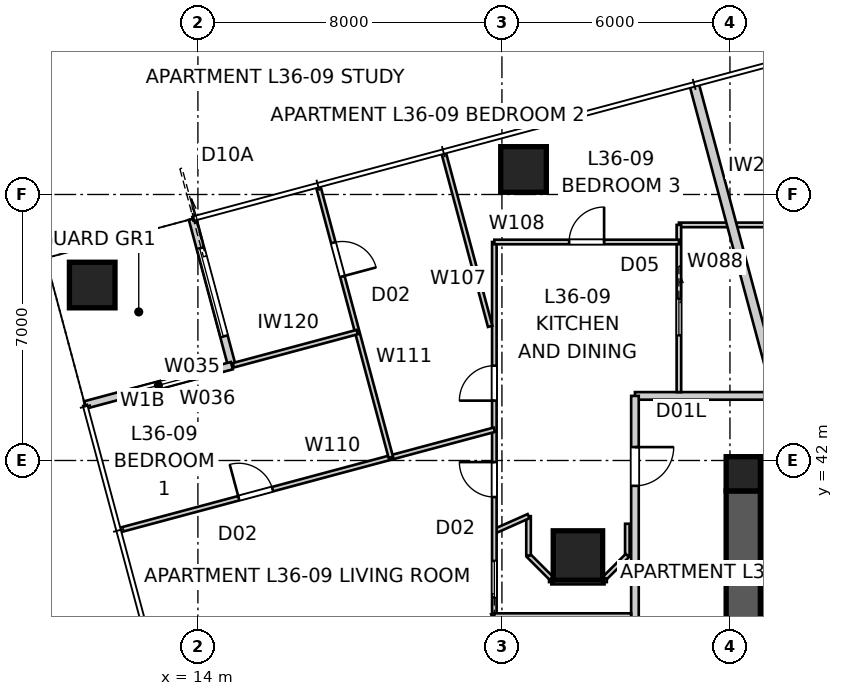
"""IFC4 building model, lengths in metres.
Left out: names, types, materials, properties, quantities, classifications, styles, units other than length and angle.
Written with IfcOpenShell. Run it as: python <this file> out.ifc"""

import sys

from ifc_helpers import new_model, si_unit, direction, frame, frame_2d, origin, origin_2d, place, context, subcontext, project, spatial, polyline, rectangle, outline, extrude, element, fill, save


model = new_model("IFC4")
c1 = context("Model", 3, precision=1e-05, world=origin(), true_north=direction((0.0, 1.0)))
c2 = subcontext(c1, "Body", "Model", "MODEL_VIEW")
j1 = project(units=[si_unit("LENGTHUNIT", "METRE"), si_unit("PLANEANGLEUNIT", "RADIAN")], contexts=[c1])
p1 = place(None, origin())
s1 = spatial("IfcSite", under=j1, at=p1, CompositionType="ELEMENT")
p2 = place(p1, origin())
s2 = spatial("IfcBuilding", under=s1, at=p2, CompositionType="ELEMENT")
p3 = place(p2, frame((0.0, 0.0, 132.0)))
s3 = spatial("IfcBuildingStorey", under=s2, at=p3, CompositionType="ELEMENT", Elevation=132.0)
p4 = place(p3, frame((28.8, 41.65, 0.0), z_axis=(0.0, 0.0, 1.0), x_axis=(1.0, 0.0, 0.0)))
e1 = element("IfcWall", 1, at=p4, inside=s3, PredefinedType="SHEAR", context=c2, shape_type="SweptSolid", body=[
    extrude(outline(polyline([(0.0, -0.45), (22.4, -0.45), (22.4, -0.025), (22.85, -0.025), (22.85, 0.025), (22.4, 0.025), (22.4, 0.45), (0.0, 0.45), (0.0, 0.025), (-0.45, 0.025), (-0.45, -0.025), (0.0, -0.025), (0.0, -0.45)])), origin(), (0.0, 0.0, 1.0), 3.4),
])
p5 = place(p3, frame((28.35, 41.2, 0.0), z_axis=(0.0, 0.0, 1.0), x_axis=(0.0, -1.0, 0.0)))
e2 = element("IfcWall", 2, at=p5, inside=s3, PredefinedType="SHEAR", context=c2, shape_type="SweptSolid", body=[
    extrude(outline(polyline([(0.0, -0.45), (22.4, -0.45), (22.4, -0.025), (22.85, -0.025), (22.85, 0.025), (22.4, 0.025), (22.4, 0.45), (0.0, 0.45), (0.0, 0.025), (-0.45, 0.025), (-0.45, -0.025), (0.0, -0.025), (0.0, -0.45)])), origin(), (0.0, 0.0, 1.0), 3.4),
])
p6 = place(p5, frame((11.14, 0.0, 0.0)))
e3 = element("IfcOpeningElement", 3, at=p6, cuts=e2, PredefinedType="OPENING", context=c2, shape_type="SweptSolid", body=[
    extrude(rectangle(XDim=1.02, YDim=2.4, at=frame_2d((0.51, 1.2))), frame((0.0, 0.46, 0.0), z_axis=(0.0, -1.0, 0.0), x_axis=(1.0, 0.0, 0.0)), (0.0, 0.0, 1.0), 0.92),
])
p7 = place(p3, frame((28.8, 39.75, 0.0), z_axis=(0.0, 0.0, 1.0), x_axis=(1.0, 0.0, 0.0)))
e4 = element("IfcWall", 4, at=p7, inside=s3, PredefinedType="SHEAR", context=c2, shape_type="SweptSolid", body=[
    extrude(rectangle(XDim=3.5, YDim=0.3, at=frame_2d((1.75, 0.0))), origin(), (0.0, 0.0, 1.0), 3.4),
])
p8 = place(p3, frame((28.35, 41.65, 0.0), z_axis=(0.0, 0.0, 1.0), x_axis=(1.0, 0.0, 0.0)))
e5 = element("IfcColumn", 5, at=p8, inside=s3, PredefinedType="COLUMN", context=c2, shape_type="SweptSolid", body=[
    extrude(rectangle(XDim=0.9, YDim=0.9, at=origin_2d()), origin(), (0.0, 0.0, 1.0), 3.4),
])
for number, where, z_axis, x_axis in (
    (6, (22.568, 49.658, 0.0), (0.0, 0.0, 1.0), (1.0, 0.0, 0.0)),
    (7, (11.219, 46.617, 0.0), (0.0, 0.0, 1.0), (1.0, 0.0, 0.0)),
):
    element("IfcColumn", number, at=place(p3, frame(where, z_axis=z_axis, x_axis=x_axis)), inside=s3, PredefinedType="COLUMN", context=c2, shape_type="SweptSolid", body=[
        extrude(rectangle(XDim=1.2, YDim=1.2, at=origin_2d()), origin(), (0.0, 0.0, 1.0), 3.4),
    ])
p9 = place(p3, frame((24.0, 39.5, 0.0), z_axis=(0.0, 0.0, 1.0), x_axis=(1.0, 0.0, 0.0)))
e8 = element("IfcColumn", 8, at=p9, inside=s3, PredefinedType="COLUMN", context=c2, shape_type="SweptSolid", body=[
    extrude(rectangle(XDim=1.3, YDim=1.3, at=origin_2d()), origin(), (0.0, 0.0, 1.0), 3.4),
])
p10 = place(p3, frame((13.857, 48.359, 0.0), z_axis=(0.0, 0.0, 1.0), x_axis=(0.258843877716, -0.965919172068, 0.0)))
e9 = element("IfcWall", 9, at=p10, inside=s3, PredefinedType="SOLIDWALL", context=c2, shape_type="SweptSolid", body=[
    extrude(rectangle(XDim=4.0, YDim=0.2, at=frame_2d((2.0, 0.0))), origin(), (0.0, 0.0, 1.0), 3.25),
])
p11 = place(p10, frame((0.8, 0.0, 0.0)))
e10 = element("IfcOpeningElement", 10, at=p11, cuts=e9, PredefinedType="OPENING", context=c2, shape_type="SweptSolid", body=[
    extrude(rectangle(XDim=2.4, YDim=2.1, at=frame_2d((1.2, 1.05))), frame((0.0, 0.11, 0.0), z_axis=(0.0, -1.0, 0.0), x_axis=(1.0, 0.0, 0.0)), (0.0, 0.0, 1.0), 0.22),
])
p12 = place(p3, frame((14.893, 44.496, 0.0), z_axis=(0.0, 0.0, 1.0), x_axis=(-0.965934430412, -0.258786931944, 0.0)))
e11 = element("IfcWall", 11, at=p12, inside=s3, PredefinedType="SOLIDWALL", context=c2, shape_type="SweptSolid", body=[
    extrude(rectangle(XDim=4.0, YDim=0.2, at=frame_2d((2.0, 0.0))), origin(), (0.0, 0.0, 1.0), 3.25),
])
p13 = place(p12, frame((1.0, 0.0, 0.45)))
e12 = element("IfcOpeningElement", 12, at=p13, cuts=e11, PredefinedType="OPENING", context=c2, shape_type="SweptSolid", body=[
    extrude(rectangle(XDim=2.0, YDim=1.8, at=frame_2d((1.0, 0.9))), frame((0.0, 0.11, 0.0), z_axis=(0.0, -1.0, 0.0), x_axis=(1.0, 0.0, 0.0)), (0.0, 0.0, 1.0), 0.22),
])
p14 = place(p3, frame((52.52, 43.7, 0.0), z_axis=(0.0, 0.0, 1.0), x_axis=(-1.0, 0.0, 0.0)))
e13 = element("IfcWall", 13, at=p14, inside=s3, PredefinedType="PARTITIONING", context=c2, shape_type="SweptSolid", body=[
    extrude(rectangle(XDim=27.02, YDim=0.2, at=frame_2d((13.51, 0.0))), origin(), (0.0, 0.0, 1.0), 3.25),
])
p15 = place(p14, frame((10.872, 0.0, 0.0)))
e14 = element("IfcOpeningElement", 14, at=p15, cuts=e13, PredefinedType="OPENING", context=c2, shape_type="SweptSolid", body=[
    extrude(rectangle(XDim=1.02, YDim=2.34, at=frame_2d((0.51, 1.17))), frame((0.0, 0.11, 0.0), z_axis=(0.0, -1.0, 0.0), x_axis=(1.0, 0.0, 0.0)), (0.0, 0.0, 1.0), 0.22),
])
p16 = place(p14, frame((3.549, 0.0, 0.0)))
e15 = element("IfcOpeningElement", 15, at=p16, cuts=e13, PredefinedType="OPENING", context=c2, shape_type="SweptSolid", body=[
    extrude(rectangle(XDim=1.02, YDim=2.34, at=frame_2d((0.51, 1.17))), frame((0.0, 0.11, 0.0), z_axis=(0.0, -1.0, 0.0), x_axis=(1.0, 0.0, 0.0)), (0.0, 0.0, 1.0), 0.22),
])
p17 = place(p3, frame((25.5, 43.7, 0.0), z_axis=(0.0, 0.0, 1.0), x_axis=(0.0, -1.0, 0.0)))
e16 = element("IfcWall", 16, at=p17, inside=s3, PredefinedType="PARTITIONING", context=c2, shape_type="SweptSolid", body=[
    extrude(rectangle(XDim=28.2, YDim=0.2, at=frame_2d((14.1, 0.0))), origin(), (0.0, 0.0, 1.0), 3.25),
])
p18 = place(p17, frame((24.646, 0.0, 0.0)))
e17 = element("IfcOpeningElement", 17, at=p18, cuts=e16, PredefinedType="OPENING", context=c2, shape_type="SweptSolid", body=[
    extrude(rectangle(XDim=1.02, YDim=2.1, at=frame_2d((0.51, 1.05))), frame((0.0, 0.11, 0.0), z_axis=(0.0, -1.0, 0.0), x_axis=(1.0, 0.0, 0.0)), (0.0, 0.0, 1.0), 0.22),
])
p19 = place(p17, frame((14.858, 0.0, 0.0)))
e18 = element("IfcOpeningElement", 18, at=p19, cuts=e16, PredefinedType="OPENING", context=c2, shape_type="SweptSolid", body=[
    extrude(rectangle(XDim=1.02, YDim=2.34, at=frame_2d((0.51, 1.17))), frame((0.0, 0.11, 0.0), z_axis=(0.0, -1.0, 0.0), x_axis=(1.0, 0.0, 0.0)), (0.0, 0.0, 1.0), 0.22),
])
p20 = place(p17, frame((1.347, 0.0, 0.0)))
e19 = element("IfcOpeningElement", 19, at=p20, cuts=e16, PredefinedType="OPENING", context=c2, shape_type="SweptSolid", body=[
    extrude(rectangle(XDim=1.02, YDim=2.1, at=frame_2d((0.51, 1.05))), frame((0.0, 0.11, 0.0), z_axis=(0.0, -1.0, 0.0), x_axis=(1.0, 0.0, 0.0)), (0.0, 0.0, 1.0), 0.22),
])
p21 = place(p3, frame((27.058, 51.896, 0.0), z_axis=(0.0, 0.0, 1.0), x_axis=(0.258819975199, -0.96592557707, 0.0)))
e20 = element("IfcWall", 20, at=p21, inside=s3, PredefinedType="PARTITIONING", context=c2, shape_type="SweptSolid", body=[
    extrude(rectangle(XDim=8.389, YDim=0.25, at=frame_2d((4.194, 0.0))), origin(), (0.0, 0.0, 1.0), 3.25),
])
p22 = place(p3, frame((26.657, 48.2, 0.0), z_axis=(0.0, 0.0, 1.0), x_axis=(1.0, 0.0, 0.0)))
e21 = element("IfcWall", 21, at=p22, inside=s3, PredefinedType="PARTITIONING", context=c2, shape_type="SweptSolid", body=[
    extrude(rectangle(XDim=31.543, YDim=0.12, at=frame_2d((15.771, 0.0))), origin(), (0.0, 0.0, 1.0), 2.637),
])
p23 = place(p22, frame((13.4, 0.0, 0.0)))
e22 = element("IfcOpeningElement", 22, at=p23, cuts=e21, PredefinedType="OPENING", context=c2, shape_type="SweptSolid", body=[
    extrude(rectangle(XDim=0.92, YDim=2.34, at=frame_2d((0.46, 1.17))), frame((0.0, 0.07, 0.0), z_axis=(0.0, -1.0, 0.0), x_axis=(1.0, 0.0, 0.0)), (0.0, 0.0, 1.0), 0.14),
])
p24 = place(p22, frame((20.723, 0.0, 0.0)))
e23 = element("IfcOpeningElement", 23, at=p24, cuts=e21, PredefinedType="OPENING", context=c2, shape_type="SweptSolid", body=[
    extrude(rectangle(XDim=0.92, YDim=2.34, at=frame_2d((0.46, 1.17))), frame((0.0, 0.07, 0.0), z_axis=(0.0, -1.0, 0.0), x_axis=(1.0, 0.0, 0.0)), (0.0, 0.0, 1.0), 0.14),
])
p25 = place(p22, frame((10.117, 0.0, 0.0)))
e24 = element("IfcOpeningElement", 24, at=p25, cuts=e21, PredefinedType="OPENING", context=c2, shape_type="SweptSolid", body=[
    extrude(rectangle(XDim=0.96, YDim=2.1, at=frame_2d((0.48, 1.05))), frame((0.0, 0.07, 0.0), z_axis=(0.0, -1.0, 0.0), x_axis=(1.0, 0.0, 0.0)), (0.0, 0.0, 1.0), 0.14),
])
p26 = place(p22, frame((28.362, 0.0, 0.0)))
e25 = element("IfcOpeningElement", 25, at=p26, cuts=e21, PredefinedType="OPENING", context=c2, shape_type="SweptSolid", body=[
    extrude(rectangle(XDim=0.92, YDim=2.34, at=frame_2d((0.46, 1.17))), frame((0.0, 0.07, 0.0), z_axis=(0.0, -1.0, 0.0), x_axis=(1.0, 0.0, 0.0)), (0.0, 0.0, 1.0), 0.14),
])
p27 = place(p22, frame((23.375, 0.0, 0.0)))
e26 = element("IfcOpeningElement", 26, at=p27, cuts=e21, PredefinedType="OPENING", context=c2, shape_type="SweptSolid", body=[
    extrude(rectangle(XDim=0.96, YDim=2.1, at=frame_2d((0.48, 1.05))), frame((0.0, 0.07, 0.0), z_axis=(0.0, -1.0, 0.0), x_axis=(1.0, 0.0, 0.0)), (0.0, 0.0, 1.0), 0.14),
])
p28 = place(p3, frame((25.3, 40.335, 0.0), z_axis=(0.0, 0.0, 1.0), x_axis=(0.0, -1.0, 0.0)))
e27 = element("IfcWall", 27, at=p28, inside=s3, PredefinedType="PARTITIONING", context=c2, shape_type="SweptSolid", body=[
    extrude(rectangle(XDim=0.835, YDim=0.12, at=frame_2d((0.417, 0.0))), origin(), (0.0, 0.0, 1.0), 3.25),
])
p29 = place(p3, frame((25.3, 39.5, 0.0), z_axis=(0.0, 0.0, 1.0), x_axis=(-0.707106781187, -0.707106781187, 0.0)))
e28 = element("IfcWall", 28, at=p29, inside=s3, PredefinedType="PARTITIONING", context=c2, shape_type="SweptSolid", body=[
    extrude(rectangle(XDim=0.849, YDim=0.12, at=frame_2d((0.424, 0.0))), origin(), (0.0, 0.0, 1.0), 3.25),
])
p30 = place(p3, frame((24.7, 38.8, 0.0), z_axis=(0.0, 0.0, 1.0), x_axis=(-1.0, 0.0, 0.0)))
e29 = element("IfcWall", 29, at=p30, inside=s3, PredefinedType="PARTITIONING", context=c2, shape_type="SweptSolid", body=[
    extrude(rectangle(XDim=1.4, YDim=0.12, at=frame_2d((0.7, 0.0))), origin(), (0.0, 0.0, 1.0), 2.796),
])
p31 = place(p3, frame((23.3, 38.9, 0.0), z_axis=(0.0, 0.0, 1.0), x_axis=(-0.707106781187, 0.707106781187, 0.0)))
e30 = element("IfcWall", 30, at=p31, inside=s3, PredefinedType="PARTITIONING", context=c2, shape_type="SweptSolid", body=[
    extrude(rectangle(XDim=0.849, YDim=0.12, at=frame_2d((0.424, 0.0))), origin(), (0.0, 0.0, 1.0), 3.25),
])
p32 = place(p3, frame((22.7, 39.5, 0.0), z_axis=(0.0, 0.0, 1.0), x_axis=(0.0, 1.0, 0.0)))
e31 = element("IfcWall", 31, at=p32, inside=s3, PredefinedType="PARTITIONING", context=c2, shape_type="SweptSolid", body=[
    extrude(rectangle(XDim=1.035, YDim=0.12, at=frame_2d((0.518, 0.0))), origin(), (0.0, 0.0, 1.0), 3.25),
])
p33 = place(p3, frame((22.7, 40.535, 0.0), z_axis=(0.0, 0.0, 1.0), x_axis=(-0.913739977195, -0.406299463544, 0.0)))
e32 = element("IfcWall", 32, at=p33, inside=s3, PredefinedType="PARTITIONING", context=c2, shape_type="SweptSolid", body=[
    extrude(rectangle(XDim=0.985, YDim=0.12, at=frame_2d((0.492, 0.0))), origin(), (0.0, 0.0, 1.0), 3.25),
])
p34 = place(p3, frame((21.8, 35.3, 0.0), z_axis=(0.0, 0.0, 1.0), x_axis=(0.0, 1.0, 0.0)))
e33 = element("IfcWall", 33, at=p34, inside=s3, PredefinedType="PARTITIONING", context=c2, shape_type="SweptSolid", body=[
    extrude(rectangle(XDim=12.45, YDim=0.12, at=frame_2d((6.225, 0.0))), origin(), (0.0, 0.0, 1.0), 2.637),
])
p35 = place(p34, frame((5.738, 0.0, 0.0)))
e34 = element("IfcOpeningElement", 34, at=p35, cuts=e33, PredefinedType="OPENING", context=c2, shape_type="SweptSolid", body=[
    extrude(rectangle(XDim=0.92, YDim=2.34, at=frame_2d((0.46, 1.17))), frame((0.0, 0.07, 0.0), z_axis=(0.0, -1.0, 0.0), x_axis=(1.0, 0.0, 0.0)), (0.0, 0.0, 1.0), 0.14),
])
p36 = place(p34, frame((8.275, 0.0, 0.0)))
e35 = element("IfcOpeningElement", 35, at=p36, cuts=e33, PredefinedType="OPENING", context=c2, shape_type="SweptSolid", body=[
    extrude(rectangle(XDim=0.92, YDim=2.34, at=frame_2d((0.46, 1.17))), frame((0.0, 0.07, 0.0), z_axis=(0.0, -1.0, 0.0), x_axis=(1.0, 0.0, 0.0)), (0.0, 0.0, 1.0), 0.14),
])
p37 = place(p34, frame((3.097, 0.0, 0.0)))
e36 = element("IfcOpeningElement", 36, at=p37, cuts=e33, PredefinedType="OPENING", context=c2, shape_type="SweptSolid", body=[
    extrude(rectangle(XDim=0.96, YDim=2.1, at=frame_2d((0.48, 1.05))), frame((0.0, 0.07, 0.0), z_axis=(0.0, -1.0, 0.0), x_axis=(1.0, 0.0, 0.0)), (0.0, 0.0, 1.0), 0.14),
])
p38 = place(p34, frame((1.047, 0.0, 0.0)))
e37 = element("IfcOpeningElement", 37, at=p38, cuts=e33, PredefinedType="OPENING", context=c2, shape_type="SweptSolid", body=[
    extrude(rectangle(XDim=0.96, YDim=2.1, at=frame_2d((0.48, 1.05))), frame((0.0, 0.07, 0.0), z_axis=(0.0, -1.0, 0.0), x_axis=(1.0, 0.0, 0.0)), (0.0, 0.0, 1.0), 0.14),
])
p39 = place(p3, frame((21.8, 47.75, 0.0), z_axis=(0.0, 0.0, 1.0), x_axis=(1.0, 0.0, 0.0)))
e38 = element("IfcWall", 38, at=p39, inside=s3, PredefinedType="PARTITIONING", context=c2, shape_type="SweptSolid", body=[
    extrude(rectangle(XDim=4.857, YDim=0.12, at=frame_2d((2.428, 0.0))), origin(), (0.0, 0.0, 1.0), 3.25),
])
p40 = place(p39, frame((1.969, 0.0, 0.0)))
e39 = element("IfcOpeningElement", 39, at=p40, cuts=e38, PredefinedType="OPENING", context=c2, shape_type="SweptSolid", body=[
    extrude(rectangle(XDim=0.92, YDim=2.34, at=frame_2d((0.46, 1.17))), frame((0.0, 0.07, 0.0), z_axis=(0.0, -1.0, 0.0), x_axis=(1.0, 0.0, 0.0)), (0.0, 0.0, 1.0), 0.14),
])
p41 = place(p3, frame((25.4, 37.918, 0.0), z_axis=(0.0, 0.0, 1.0), x_axis=(-1.0, 0.0, 0.0)))
e40 = element("IfcWall", 40, at=p41, inside=s3, PredefinedType="PARTITIONING", context=c2, shape_type="SweptSolid", body=[
    extrude(rectangle(XDim=3.6, YDim=0.12, at=frame_2d((1.8, 0.0))), origin(), (0.0, 0.0, 1.0), 3.25),
])
p42 = place(p3, frame((11.952, 40.17, 0.0), z_axis=(0.0, 0.0, 1.0), x_axis=(0.965923039694, 0.258829444594, 0.0)))
e41 = element("IfcWall", 41, at=p42, inside=s3, PredefinedType="PARTITIONING", context=c2, shape_type="SweptSolid", body=[
    extrude(rectangle(XDim=10.196, YDim=0.12, at=frame_2d((5.098, 0.0))), origin(), (0.0, 0.0, 1.0), 3.25),
])
p43 = place(p42, frame((3.233, 0.0, 0.0)))
e42 = element("IfcOpeningElement", 42, at=p43, cuts=e41, PredefinedType="OPENING", context=c2, shape_type="SweptSolid", body=[
    extrude(rectangle(XDim=0.92, YDim=2.34, at=frame_2d((0.46, 1.17))), frame((0.0, 0.07, 0.0), z_axis=(0.0, -1.0, 0.0), x_axis=(1.0, 0.0, 0.0)), (0.0, 0.0, 1.0), 0.14),
])
p44 = place(p3, frame((17.168, 49.205, 0.0), z_axis=(0.0, 0.0, 1.0), x_axis=(0.258846923464, -0.965918355874, 0.0)))
e43 = element("IfcWall", 43, at=p44, inside=s3, PredefinedType="PARTITIONING", context=c2, shape_type="SweptSolid", body=[
    extrude(rectangle(XDim=7.377, YDim=0.12, at=frame_2d((3.688, 0.0))), origin(), (0.0, 0.0, 1.0), 3.25),
])
p45 = place(p44, frame((1.525, 0.0, 0.0)))
e44 = element("IfcOpeningElement", 44, at=p45, cuts=e43, PredefinedType="OPENING", context=c2, shape_type="SweptSolid", body=[
    extrude(rectangle(XDim=0.92, YDim=2.34, at=frame_2d((0.46, 1.17))), frame((0.0, 0.07, 0.0), z_axis=(0.0, -1.0, 0.0), x_axis=(1.0, 0.0, 0.0)), (0.0, 0.0, 1.0), 0.14),
])
p46 = place(p3, frame((14.931, 44.506, 0.0), z_axis=(0.0, 0.0, 1.0), x_axis=(0.96593546512, 0.258783069815, 0.0)))
e45 = element("IfcWall", 45, at=p46, inside=s3, PredefinedType="PARTITIONING", context=c2, shape_type="SweptSolid", body=[
    extrude(rectangle(XDim=3.376, YDim=0.12, at=frame_2d((1.688, 0.0))), origin(), (0.0, 0.0, 1.0), 3.25),
])
p47 = place(p3, frame((20.468, 50.089, 0.0), z_axis=(0.0, 0.0, 1.0), x_axis=(0.258808471399, -0.965928659442, 0.0)))
e46 = element("IfcWall", 46, at=p47, inside=s3, PredefinedType="PARTITIONING", context=c2, shape_type="SweptSolid", body=[
    extrude(rectangle(XDim=4.72, YDim=0.12, at=frame_2d((2.36, 0.0))), origin(), (0.0, 0.0, 1.0), 2.637),
])
p48 = place(p3, frame((26.657, 48.2, 0.0), z_axis=(0.0, 0.0, 1.0), x_axis=(0.0, -1.0, 0.0)))
e47 = element("IfcWall", 47, at=p48, inside=s3, PredefinedType="PARTITIONING", context=c2, shape_type="SweptSolid", body=[
    extrude(rectangle(XDim=4.4, YDim=0.12, at=frame_2d((2.2, 0.0))), origin(), (0.0, 0.0, 1.0), 3.25),
])
p49 = place(p48, frame((1.945, 0.0, 0.0)))
e48 = element("IfcOpeningElement", 48, at=p49, cuts=e47, PredefinedType="OPENING", context=c2, shape_type="SweptSolid", body=[
    extrude(rectangle(XDim=0.96, YDim=2.1, at=frame_2d((0.48, 1.05))), frame((0.0, 0.07, 0.0), z_axis=(0.0, -1.0, 0.0), x_axis=(1.0, 0.0, 0.0)), (0.0, 0.0, 1.0), 0.14),
])
for number, where, z_axis, x_axis in (
    (49, (24.7, 38.8, 0.0), (0.0, 0.0, 1.0), (0.0, 1.0, 0.0)),
    (50, (23.3, 38.8, 0.0), (0.0, 0.0, 1.0), (0.0, 1.0, 0.0)),
):
    element("IfcWall", number, at=place(p3, frame(where, z_axis=z_axis, x_axis=x_axis)), inside=s3, PredefinedType="PARTITIONING", context=c2, shape_type="SweptSolid", body=[
        extrude(rectangle(XDim=0.1, YDim=0.12, at=frame_2d((0.05, 0.0))), origin(), (0.0, 0.0, 1.0), 3.25),
    ])
p50 = place(p11, origin())
e51 = element("IfcDoor", 51, at=p50, inside=s3, OperationType="SLIDING_TO_LEFT", PredefinedType="DOOR", context=c2, shape_type="SweptSolid", body=[
    extrude(rectangle(XDim=2.4, YDim=2.1, at=frame_2d((1.2, 1.05))), frame((0.0, 0.025, 0.0), z_axis=(0.0, -1.0, 0.0), x_axis=(1.0, 0.0, 0.0)), (0.0, 0.0, 1.0), 0.05),
])
fill(e10, e51)
p51 = place(p13, origin())
e52 = element("IfcWindow", 52, at=p51, inside=s3, PartitioningType="SINGLE_PANEL", PredefinedType="WINDOW", context=c2, shape_type="SweptSolid", body=[
    extrude(rectangle(XDim=2.0, YDim=1.8, at=frame_2d((1.0, 0.9))), frame((0.0, 0.03, 0.0), z_axis=(0.0, -1.0, 0.0), x_axis=(1.0, 0.0, 0.0)), (0.0, 0.0, 1.0), 0.06),
])
fill(e12, e52)
p52 = place(p20, origin())
e53 = element("IfcDoor", 53, at=p52, inside=s3, OperationType="SINGLE_SWING_LEFT", PredefinedType="DOOR", context=c2, shape_type="SweptSolid", body=[
    extrude(rectangle(XDim=1.02, YDim=2.1, at=frame_2d((0.51, 1.05))), frame((0.0, 0.025, 0.0), z_axis=(0.0, -1.0, 0.0), x_axis=(1.0, 0.0, 0.0)), (0.0, 0.0, 1.0), 0.05),
])
fill(e19, e53)
p53 = place(p40, origin())
e54 = element("IfcDoor", 54, at=p53, inside=s3, OperationType="SINGLE_SWING_RIGHT", PredefinedType="DOOR", context=c2, shape_type="SweptSolid", body=[
    extrude(rectangle(XDim=0.92, YDim=2.34, at=frame_2d((0.46, 1.17))), frame((0.0, 0.025, 0.0), z_axis=(0.0, -1.0, 0.0), x_axis=(1.0, 0.0, 0.0)), (0.0, 0.0, 1.0), 0.05),
])
fill(e39, e54)
p54 = place(p49, origin())
e55 = element("IfcDoor", 55, at=p54, inside=s3, OperationType="SLIDING_TO_LEFT", PredefinedType="DOOR", context=c2, shape_type="SweptSolid", body=[
    extrude(rectangle(XDim=0.96, YDim=2.1, at=frame_2d((0.48, 1.05))), frame((0.0, 0.025, 0.0), z_axis=(0.0, -1.0, 0.0), x_axis=(1.0, 0.0, 0.0)), (0.0, 0.0, 1.0), 0.05),
])
fill(e48, e55)
p55 = place(p35, origin())
e56 = element("IfcDoor", 56, at=p55, inside=s3, OperationType="SINGLE_SWING_RIGHT", PredefinedType="DOOR", context=c2, shape_type="SweptSolid", body=[
    extrude(rectangle(XDim=0.92, YDim=2.34, at=frame_2d((0.46, 1.17))), frame((0.0, 0.025, 0.0), z_axis=(0.0, -1.0, 0.0), x_axis=(1.0, 0.0, 0.0)), (0.0, 0.0, 1.0), 0.05),
])
fill(e34, e56)
p56 = place(p36, origin())
e57 = element("IfcDoor", 57, at=p56, inside=s3, OperationType="SINGLE_SWING_LEFT", PredefinedType="DOOR", context=c2, shape_type="SweptSolid", body=[
    extrude(rectangle(XDim=0.92, YDim=2.34, at=frame_2d((0.46, 1.17))), frame((0.0, 0.025, 0.0), z_axis=(0.0, -1.0, 0.0), x_axis=(1.0, 0.0, 0.0)), (0.0, 0.0, 1.0), 0.05),
])
fill(e35, e57)
p57 = place(p43, origin())
e58 = element("IfcDoor", 58, at=p57, inside=s3, OperationType="SINGLE_SWING_LEFT", PredefinedType="DOOR", context=c2, shape_type="SweptSolid", body=[
    extrude(rectangle(XDim=0.92, YDim=2.34, at=frame_2d((0.46, 1.17))), frame((0.0, 0.025, 0.0), z_axis=(0.0, -1.0, 0.0), x_axis=(1.0, 0.0, 0.0)), (0.0, 0.0, 1.0), 0.05),
])
fill(e42, e58)
p58 = place(p37, origin())
e59 = element("IfcDoor", 59, at=p58, inside=s3, OperationType="SLIDING_TO_LEFT", PredefinedType="DOOR", context=c2, shape_type="SweptSolid", body=[
    extrude(rectangle(XDim=0.96, YDim=2.1, at=frame_2d((0.48, 1.05))), frame((0.0, 0.025, 0.0), z_axis=(0.0, -1.0, 0.0), x_axis=(1.0, 0.0, 0.0)), (0.0, 0.0, 1.0), 0.05),
])
fill(e36, e59)
p59 = place(p45, origin())
e60 = element("IfcDoor", 60, at=p59, inside=s3, OperationType="SINGLE_SWING_RIGHT", PredefinedType="DOOR", context=c2, shape_type="SweptSolid", body=[
    extrude(rectangle(XDim=0.92, YDim=2.34, at=frame_2d((0.46, 1.17))), frame((0.0, 0.025, 0.0), z_axis=(0.0, -1.0, 0.0), x_axis=(1.0, 0.0, 0.0)), (0.0, 0.0, 1.0), 0.05),
])
fill(e44, e60)
save(model, sys.argv[1])
